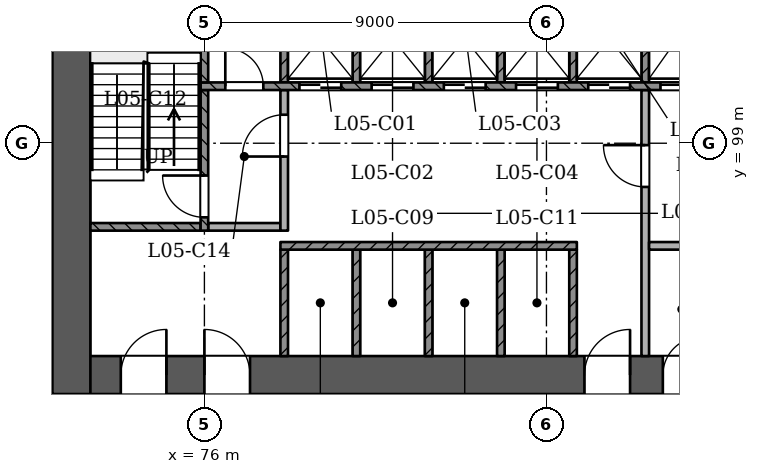
"""IFC4 building model, lengths in metres.
Left out: names, types, materials, properties, quantities, classifications, styles, units other than length and angle.
Written with IfcOpenShell. Run it as: python <this file> out.ifc"""

import sys

from ifc_helpers import new_model, si_unit, direction, frame, frame_2d, origin, place, context, subcontext, project, spatial, rectangle, extrude, element, fill, save


model = new_model("IFC4")
c1 = context("Model", 3, precision=1e-05, world=origin(), true_north=direction((0.0, 1.0)))
c2 = subcontext(c1, "Body", "Model", "MODEL_VIEW")
j1 = project(units=[si_unit("LENGTHUNIT", "METRE"), si_unit("PLANEANGLEUNIT", "RADIAN")], contexts=[c1])
p1 = place(None, origin())
s1 = spatial("IfcSite", under=j1, at=p1, CompositionType="ELEMENT")
p2 = place(p1, origin())
s2 = spatial("IfcBuilding", under=s1, at=p2, CompositionType="ELEMENT")
p3 = place(p2, frame((0.0, 0.0, 27.0)))
s3 = spatial("IfcBuildingStorey", under=s2, at=p3, CompositionType="ELEMENT", Elevation=27.0)
p4 = place(p3, frame((72.5, 92.9, 0.0), z_axis=(0.0, 0.0, 1.0), x_axis=(1.0, 0.0, 0.0)))
e1 = element("IfcWall", 1, at=p4, inside=s3, PredefinedType="SHEAR", context=c2, shape_type="SweptSolid", body=[
    extrude(rectangle(XDim=25.5, YDim=1.0, at=frame_2d((12.75, 0.0))), origin(), (0.0, 0.0, 1.0), 3.6),
])
p5 = place(p4, frame((1.3, 0.0, 0.0)))
e2 = element("IfcOpeningElement", 2, at=p5, cuts=e1, PredefinedType="OPENING", context=c2, shape_type="SweptSolid", body=[
    extrude(rectangle(XDim=1.2, YDim=2.1, at=frame_2d((0.6, 1.05))), frame((0.0, 0.51, 0.0), z_axis=(0.0, -1.0, 0.0), x_axis=(1.0, 0.0, 0.0)), (0.0, 0.0, 1.0), 1.021),
])
p6 = place(p4, frame((3.5, 0.0, 0.0)))
e3 = element("IfcOpeningElement", 3, at=p6, cuts=e1, PredefinedType="OPENING", context=c2, shape_type="SweptSolid", body=[
    extrude(rectangle(XDim=1.2, YDim=2.1, at=frame_2d((0.6, 1.05))), frame((0.0, 0.51, 0.0), z_axis=(0.0, -1.0, 0.0), x_axis=(1.0, 0.0, 0.0)), (0.0, 0.0, 1.0), 1.021),
])
p7 = place(p4, frame((13.5, 0.0, 0.0)))
e4 = element("IfcOpeningElement", 4, at=p7, cuts=e1, PredefinedType="OPENING", context=c2, shape_type="SweptSolid", body=[
    extrude(rectangle(XDim=1.2, YDim=2.1, at=frame_2d((0.6, 1.05))), frame((0.0, 0.51, 0.0), z_axis=(0.0, -1.0, 0.0), x_axis=(1.0, 0.0, 0.0)), (0.0, 0.0, 1.0), 1.021),
])
p8 = place(p4, frame((15.562, 0.0, 0.0)))
e5 = element("IfcOpeningElement", 5, at=p8, cuts=e1, PredefinedType="OPENING", context=c2, shape_type="SweptSolid", body=[
    extrude(rectangle(XDim=1.0, YDim=2.1, at=frame_2d((0.5, 1.05))), frame((0.0, 0.51, 0.0), z_axis=(0.0, -1.0, 0.0), x_axis=(1.0, 0.0, 0.0)), (0.0, 0.0, 1.0), 1.021),
])
p9 = place(p4, frame((17.8, 0.0, 0.0)))
e6 = element("IfcOpeningElement", 6, at=p9, cuts=e1, PredefinedType="OPENING", context=c2, shape_type="SweptSolid", body=[
    extrude(rectangle(XDim=1.0, YDim=2.1, at=frame_2d((0.5, 1.05))), frame((0.0, 0.51, 0.0), z_axis=(0.0, -1.0, 0.0), x_axis=(1.0, 0.0, 0.0)), (0.0, 0.0, 1.0), 1.021),
])
p10 = place(p4, frame((20.35, 0.0, 0.0)))
e7 = element("IfcOpeningElement", 7, at=p10, cuts=e1, PredefinedType="OPENING", context=c2, shape_type="SweptSolid", body=[
    extrude(rectangle(XDim=1.0, YDim=2.1, at=frame_2d((0.5, 1.05))), frame((0.0, 0.51, 0.0), z_axis=(0.0, -1.0, 0.0), x_axis=(1.0, 0.0, 0.0)), (0.0, 0.0, 1.0), 1.021),
])
p11 = place(p4, frame((22.837, 0.0, 0.0)))
e8 = element("IfcOpeningElement", 8, at=p11, cuts=e1, PredefinedType="OPENING", context=c2, shape_type="SweptSolid", body=[
    extrude(rectangle(XDim=1.0, YDim=2.1, at=frame_2d((0.5, 1.05))), frame((0.0, 0.51, 0.0), z_axis=(0.0, -1.0, 0.0), x_axis=(1.0, 0.0, 0.0)), (0.0, 0.0, 1.0), 1.021),
])
p12 = place(p3, frame((72.5, 103.9, 0.0), z_axis=(0.0, 0.0, 1.0), x_axis=(0.0, -1.0, 0.0)))
e9 = element("IfcWall", 9, at=p12, inside=s3, PredefinedType="SHEAR", context=c2, shape_type="SweptSolid", body=[
    extrude(rectangle(XDim=11.5, YDim=1.0, at=frame_2d((5.75, 0.0))), origin(), (0.0, 0.0, 1.0), 3.6),
])
p13 = place(p3, frame((61.193, 96.236, 0.0), z_axis=(0.0, 0.0, 1.0), x_axis=(0.49999953585, -0.866025671762, 0.0)))
e10 = element("IfcWall", 10, at=p13, inside=s3, PredefinedType="PARTITIONING", context=c2, shape_type="SweptSolid", body=[
    extrude(rectangle(XDim=45.0, YDim=0.15, at=frame_2d((22.5, 0.0))), origin(), (0.0, 0.0, 1.0), 2.7),
])
p14 = place(p13, frame((1.75, 0.0, 0.0)))
e11 = element("IfcOpeningElement", 11, at=p14, cuts=e10, PredefinedType="OPENING", context=c2, shape_type="SweptSolid", body=[
    extrude(rectangle(XDim=1.0, YDim=2.1, at=frame_2d((0.5, 1.05))), frame((0.0, 0.085, 0.0), z_axis=(0.0, -1.0, 0.0), x_axis=(1.0, 0.0, 0.0)), (0.0, 0.0, 1.0), 0.171),
])
p15 = place(p13, frame((7.3, 0.0, 0.0)))
e12 = element("IfcOpeningElement", 12, at=p15, cuts=e10, PredefinedType="OPENING", context=c2, shape_type="SweptSolid", body=[
    extrude(rectangle(XDim=1.2, YDim=2.1, at=frame_2d((0.6, 1.05))), frame((0.0, 0.085, 0.0), z_axis=(0.0, -1.0, 0.0), x_axis=(1.0, 0.0, 0.0)), (0.0, 0.0, 1.0), 0.171),
])
p16 = place(p13, frame((14.071, 0.0, 0.0)))
e13 = element("IfcOpeningElement", 13, at=p16, cuts=e10, PredefinedType="OPENING", context=c2, shape_type="SweptSolid", body=[
    extrude(rectangle(XDim=1.1, YDim=2.1, at=frame_2d((0.55, 1.05))), frame((0.0, 0.085, 0.0), z_axis=(0.0, -1.0, 0.0), x_axis=(1.0, 0.0, 0.0)), (0.0, 0.0, 1.0), 0.171),
])
p17 = place(p13, frame((20.78, 0.0, 0.0)))
e14 = element("IfcOpeningElement", 14, at=p17, cuts=e10, PredefinedType="OPENING", context=c2, shape_type="SweptSolid", body=[
    extrude(rectangle(XDim=1.0, YDim=2.1, at=frame_2d((0.5, 1.05))), frame((0.0, 0.085, 0.0), z_axis=(0.0, -1.0, 0.0), x_axis=(1.0, 0.0, 0.0)), (0.0, 0.0, 1.0), 0.171),
])
p18 = place(p13, frame((23.105, 0.0, 0.0)))
e15 = element("IfcOpeningElement", 15, at=p18, cuts=e10, PredefinedType="OPENING", context=c2, shape_type="SweptSolid", body=[
    extrude(rectangle(XDim=1.0, YDim=2.1, at=frame_2d((0.5, 1.05))), frame((0.0, 0.085, 0.0), z_axis=(0.0, -1.0, 0.0), x_axis=(1.0, 0.0, 0.0)), (0.0, 0.0, 1.0), 0.171),
])
p19 = place(p13, frame((28.75, 0.0, 0.0)))
e16 = element("IfcOpeningElement", 16, at=p19, cuts=e10, PredefinedType="OPENING", context=c2, shape_type="SweptSolid", body=[
    extrude(rectangle(XDim=1.0, YDim=2.1, at=frame_2d((0.5, 1.05))), frame((0.0, 0.085, 0.0), z_axis=(0.0, -1.0, 0.0), x_axis=(1.0, 0.0, 0.0)), (0.0, 0.0, 1.0), 0.171),
])
p20 = place(p13, frame((34.3, 0.0, 0.0)))
e17 = element("IfcOpeningElement", 17, at=p20, cuts=e10, PredefinedType="OPENING", context=c2, shape_type="SweptSolid", body=[
    extrude(rectangle(XDim=1.2, YDim=2.1, at=frame_2d((0.6, 1.05))), frame((0.0, 0.085, 0.0), z_axis=(0.0, -1.0, 0.0), x_axis=(1.0, 0.0, 0.0)), (0.0, 0.0, 1.0), 0.171),
])
p21 = place(p13, frame((43.28, 0.0, 0.0)))
e18 = element("IfcOpeningElement", 18, at=p21, cuts=e10, PredefinedType="OPENING", context=c2, shape_type="SweptSolid", body=[
    extrude(rectangle(XDim=1.0, YDim=2.1, at=frame_2d((0.5, 1.05))), frame((0.0, 0.085, 0.0), z_axis=(0.0, -1.0, 0.0), x_axis=(1.0, 0.0, 0.0)), (0.0, 0.0, 1.0), 0.171),
])
for number, where, z_axis, x_axis in (
    (19, (78.1, 93.4, 0.0), (0.0, 0.0, 1.0), (0.0, 1.0, 0.0)),
    (20, (80.0, 93.4, 0.0), (0.0, 0.0, 1.0), (0.0, 1.0, 0.0)),
    (21, (81.9, 93.4, 0.0), (0.0, 0.0, 1.0), (0.0, 1.0, 0.0)),
    (22, (83.8, 93.4, 0.0), (0.0, 0.0, 1.0), (0.0, 1.0, 0.0)),
    (23, (85.7, 93.4, 0.0), (0.0, 0.0, 1.0), (0.0, 1.0, 0.0)),
):
    element("IfcWall", number, at=place(p3, frame(where, z_axis=z_axis, x_axis=x_axis)), inside=s3, PredefinedType="SOLIDWALL", context=c2, shape_type="SweptSolid", body=[
        extrude(rectangle(XDim=2.8, YDim=0.2, at=frame_2d((1.4, 0.0))), origin(), (0.0, 0.0, 1.0), 3.1),
    ])
p22 = place(p3, frame((87.6, 93.4, 0.0), z_axis=(0.0, 0.0, 1.0), x_axis=(0.0, 1.0, 0.0)))
e24 = element("IfcWall", 24, at=p22, inside=s3, PredefinedType="PARTITIONING", context=c2, shape_type="SweptSolid", body=[
    extrude(rectangle(XDim=7.0, YDim=0.2, at=frame_2d((3.5, 0.0))), origin(), (0.0, 0.0, 1.0), 3.1),
])
p23 = place(p22, frame((4.45, 0.0, 0.0)))
e25 = element("IfcOpeningElement", 25, at=p23, cuts=e24, PredefinedType="OPENING", context=c2, shape_type="SweptSolid", body=[
    extrude(rectangle(XDim=1.1, YDim=2.1, at=frame_2d((0.55, 1.05))), frame((0.0, 0.11, 0.0), z_axis=(0.0, -1.0, 0.0), x_axis=(1.0, 0.0, 0.0)), (0.0, 0.0, 1.0), 0.221),
])
p24 = place(p3, frame((78.0, 96.3, 0.0), z_axis=(0.0, 0.0, 1.0), x_axis=(1.0, 0.0, 0.0)))
e26 = element("IfcWall", 26, at=p24, inside=s3, PredefinedType="SOLIDWALL", context=c2, shape_type="SweptSolid", body=[
    extrude(rectangle(XDim=7.8, YDim=0.2, at=frame_2d((3.9, 0.0))), origin(), (0.0, 0.0, 1.0), 3.1),
])
p25 = place(p3, frame((87.7, 96.3, 0.0), z_axis=(0.0, 0.0, 1.0), x_axis=(1.0, 0.0, 0.0)))
e27 = element("IfcWall", 27, at=p25, inside=s3, PredefinedType="PARTITIONING", context=c2, shape_type="SweptSolid", body=[
    extrude(rectangle(XDim=3.6, YDim=0.2, at=frame_2d((1.8, 0.0))), origin(), (0.0, 0.0, 1.0), 3.1),
])
p26 = place(p3, frame((73.0, 96.8, 0.0), z_axis=(0.0, 0.0, 1.0), x_axis=(1.0, 0.0, 0.0)))
e28 = element("IfcWall", 28, at=p26, inside=s3, PredefinedType="SOLIDWALL", context=c2, shape_type="SweptSolid", body=[
    extrude(rectangle(XDim=2.9, YDim=0.2, at=frame_2d((1.45, 0.0))), origin(), (0.0, 0.0, 1.0), 3.1),
])
p27 = place(p3, frame((76.0, 96.7, 0.0), z_axis=(0.0, 0.0, 1.0), x_axis=(0.0, 1.0, 0.0)))
e29 = element("IfcWall", 29, at=p27, inside=s3, PredefinedType="SOLIDWALL", context=c2, shape_type="SweptSolid", body=[
    extrude(rectangle(XDim=3.7, YDim=0.2, at=frame_2d((1.85, 0.0))), origin(), (0.0, 0.0, 1.0), 3.1),
])
p28 = place(p27, frame((0.35, 0.0, 0.0)))
e30 = element("IfcOpeningElement", 30, at=p28, cuts=e29, PredefinedType="OPENING", context=c2, shape_type="SweptSolid", body=[
    extrude(rectangle(XDim=1.1, YDim=2.1, at=frame_2d((0.55, 1.05))), frame((0.0, 0.11, 0.0), z_axis=(0.0, -1.0, 0.0), x_axis=(1.0, 0.0, 0.0)), (0.0, 0.0, 1.0), 0.221),
])
p29 = place(p3, frame((76.1, 96.8, 0.0), z_axis=(0.0, 0.0, 1.0), x_axis=(1.0, 0.0, 0.0)))
e31 = element("IfcWall", 31, at=p29, inside=s3, PredefinedType="PARTITIONING", context=c2, shape_type="SweptSolid", body=[
    extrude(rectangle(XDim=1.9, YDim=0.2, at=frame_2d((0.95, 0.0))), origin(), (0.0, 0.0, 1.0), 3.1),
])
p30 = place(p3, frame((78.1, 96.7, 0.0), z_axis=(0.0, 0.0, 1.0), x_axis=(0.0, 1.0, 0.0)))
e32 = element("IfcWall", 32, at=p30, inside=s3, PredefinedType="PARTITIONING", context=c2, shape_type="SweptSolid", body=[
    extrude(rectangle(XDim=3.7, YDim=0.2, at=frame_2d((1.85, 0.0))), origin(), (0.0, 0.0, 1.0), 3.1),
])
p31 = place(p30, frame((1.95, 0.0, 0.0)))
e33 = element("IfcOpeningElement", 33, at=p31, cuts=e32, PredefinedType="OPENING", context=c2, shape_type="SweptSolid", body=[
    extrude(rectangle(XDim=1.1, YDim=2.1, at=frame_2d((0.55, 1.05))), frame((0.0, 0.11, 0.0), z_axis=(0.0, -1.0, 0.0), x_axis=(1.0, 0.0, 0.0)), (0.0, 0.0, 1.0), 0.221),
])
p32 = place(p3, frame((75.9, 100.5, 0.0), z_axis=(0.0, 0.0, 1.0), x_axis=(1.0, 0.0, 0.0)))
e34 = element("IfcWall", 34, at=p32, inside=s3, PredefinedType="SOLIDWALL", context=c2, shape_type="SweptSolid", body=[
    extrude(rectangle(XDim=18.2, YDim=0.2, at=frame_2d((9.1, 0.0))), origin(), (0.0, 0.0, 1.0), 3.1),
])
p33 = place(p32, frame((2.6, 0.0, 0.0)))
e35 = element("IfcOpeningElement", 35, at=p33, cuts=e34, PredefinedType="OPENING", context=c2, shape_type="SweptSolid", body=[
    extrude(rectangle(XDim=1.1, YDim=2.1, at=frame_2d((0.55, 1.05))), frame((0.0, 0.11, 0.0), z_axis=(0.0, -1.0, 0.0), x_axis=(1.0, 0.0, 0.0)), (0.0, 0.0, 1.0), 0.221),
])
p34 = place(p32, frame((4.5, 0.0, 0.0)))
e36 = element("IfcOpeningElement", 36, at=p34, cuts=e34, PredefinedType="OPENING", context=c2, shape_type="SweptSolid", body=[
    extrude(rectangle(XDim=1.1, YDim=2.1, at=frame_2d((0.55, 1.05))), frame((0.0, 0.11, 0.0), z_axis=(0.0, -1.0, 0.0), x_axis=(1.0, 0.0, 0.0)), (0.0, 0.0, 1.0), 0.221),
])
p35 = place(p32, frame((6.4, 0.0, 0.0)))
e37 = element("IfcOpeningElement", 37, at=p35, cuts=e34, PredefinedType="OPENING", context=c2, shape_type="SweptSolid", body=[
    extrude(rectangle(XDim=1.1, YDim=2.1, at=frame_2d((0.55, 1.05))), frame((0.0, 0.11, 0.0), z_axis=(0.0, -1.0, 0.0), x_axis=(1.0, 0.0, 0.0)), (0.0, 0.0, 1.0), 0.221),
])
p36 = place(p32, frame((8.3, 0.0, 0.0)))
e38 = element("IfcOpeningElement", 38, at=p36, cuts=e34, PredefinedType="OPENING", context=c2, shape_type="SweptSolid", body=[
    extrude(rectangle(XDim=1.1, YDim=2.1, at=frame_2d((0.55, 1.05))), frame((0.0, 0.11, 0.0), z_axis=(0.0, -1.0, 0.0), x_axis=(1.0, 0.0, 0.0)), (0.0, 0.0, 1.0), 0.221),
])
p37 = place(p32, frame((10.2, 0.0, 0.0)))
e39 = element("IfcOpeningElement", 39, at=p37, cuts=e34, PredefinedType="OPENING", context=c2, shape_type="SweptSolid", body=[
    extrude(rectangle(XDim=1.1, YDim=2.1, at=frame_2d((0.55, 1.05))), frame((0.0, 0.11, 0.0), z_axis=(0.0, -1.0, 0.0), x_axis=(1.0, 0.0, 0.0)), (0.0, 0.0, 1.0), 0.221),
])
p38 = place(p32, frame((12.1, 0.0, 0.0)))
e40 = element("IfcOpeningElement", 40, at=p38, cuts=e34, PredefinedType="OPENING", context=c2, shape_type="SweptSolid", body=[
    extrude(rectangle(XDim=1.1, YDim=2.1, at=frame_2d((0.55, 1.05))), frame((0.0, 0.11, 0.0), z_axis=(0.0, -1.0, 0.0), x_axis=(1.0, 0.0, 0.0)), (0.0, 0.0, 1.0), 0.221),
])
p39 = place(p32, frame((14.0, 0.0, 0.0)))
e41 = element("IfcOpeningElement", 41, at=p39, cuts=e34, PredefinedType="OPENING", context=c2, shape_type="SweptSolid", body=[
    extrude(rectangle(XDim=1.1, YDim=2.1, at=frame_2d((0.55, 1.05))), frame((0.0, 0.11, 0.0), z_axis=(0.0, -1.0, 0.0), x_axis=(1.0, 0.0, 0.0)), (0.0, 0.0, 1.0), 0.221),
])
p40 = place(p32, frame((0.65, 0.0, 0.0)))
e42 = element("IfcOpeningElement", 42, at=p40, cuts=e34, PredefinedType="OPENING", context=c2, shape_type="SweptSolid", body=[
    extrude(rectangle(XDim=1.0, YDim=2.1, at=frame_2d((0.5, 1.05))), frame((0.0, 0.11, 0.0), z_axis=(0.0, -1.0, 0.0), x_axis=(1.0, 0.0, 0.0)), (0.0, 0.0, 1.0), 0.221),
])
p41 = place(p32, frame((16.3, 0.0, 0.0)))
e43 = element("IfcOpeningElement", 43, at=p41, cuts=e34, PredefinedType="OPENING", context=c2, shape_type="SweptSolid", body=[
    extrude(rectangle(XDim=1.0, YDim=2.1, at=frame_2d((0.5, 1.05))), frame((0.0, 0.11, 0.0), z_axis=(0.0, -1.0, 0.0), x_axis=(1.0, 0.0, 0.0)), (0.0, 0.0, 1.0), 0.221),
])
for number, where, z_axis, x_axis in (
    (44, (76.0, 100.6, 0.0), (0.0, 0.0, 1.0), (0.0, 1.0, 0.0)),
    (45, (78.1, 100.6, 0.0), (0.0, 0.0, 1.0), (0.0, 1.0, 0.0)),
    (46, (80.0, 100.6, 0.0), (0.0, 0.0, 1.0), (0.0, 1.0, 0.0)),
    (47, (81.9, 100.6, 0.0), (0.0, 0.0, 1.0), (0.0, 1.0, 0.0)),
    (48, (83.8, 100.6, 0.0), (0.0, 0.0, 1.0), (0.0, 1.0, 0.0)),
    (49, (85.7, 100.6, 0.0), (0.0, 0.0, 1.0), (0.0, 1.0, 0.0)),
    (50, (87.6, 100.6, 0.0), (0.0, 0.0, 1.0), (0.0, 1.0, 0.0)),
):
    element("IfcWall", number, at=place(p3, frame(where, z_axis=z_axis, x_axis=x_axis)), inside=s3, PredefinedType="SOLIDWALL", context=c2, shape_type="SweptSolid", body=[
        extrude(rectangle(XDim=2.8, YDim=0.2, at=frame_2d((1.4, 0.0))), origin(), (0.0, 0.0, 1.0), 3.1),
    ])
p42 = place(p33, origin())
e51 = element("IfcDoor", 51, at=p42, inside=s3, OperationType="SLIDING_TO_RIGHT", PredefinedType="NOTDEFINED", context=c2, shape_type="SweptSolid", body=[
    extrude(rectangle(XDim=1.1, YDim=2.1, at=frame_2d((0.55, 1.05))), frame((0.0, 0.025, 0.0), z_axis=(0.0, -1.0, 0.0), x_axis=(1.0, 0.0, 0.0)), (0.0, 0.0, 1.0), 0.05),
])
fill(e35, e51)
p43 = place(p34, origin())
e52 = element("IfcDoor", 52, at=p43, inside=s3, OperationType="SLIDING_TO_LEFT", PredefinedType="NOTDEFINED", context=c2, shape_type="SweptSolid", body=[
    extrude(rectangle(XDim=1.1, YDim=2.1, at=frame_2d((0.55, 1.05))), frame((0.0, 0.025, 0.0), z_axis=(0.0, -1.0, 0.0), x_axis=(1.0, 0.0, 0.0)), (0.0, 0.0, 1.0), 0.05),
])
fill(e36, e52)
p44 = place(p35, origin())
e53 = element("IfcDoor", 53, at=p44, inside=s3, OperationType="SLIDING_TO_RIGHT", PredefinedType="NOTDEFINED", context=c2, shape_type="SweptSolid", body=[
    extrude(rectangle(XDim=1.1, YDim=2.1, at=frame_2d((0.55, 1.05))), frame((0.0, 0.025, 0.0), z_axis=(0.0, -1.0, 0.0), x_axis=(1.0, 0.0, 0.0)), (0.0, 0.0, 1.0), 0.05),
])
fill(e37, e53)
p45 = place(p36, origin())
e54 = element("IfcDoor", 54, at=p45, inside=s3, OperationType="SLIDING_TO_LEFT", PredefinedType="NOTDEFINED", context=c2, shape_type="SweptSolid", body=[
    extrude(rectangle(XDim=1.1, YDim=2.1, at=frame_2d((0.55, 1.05))), frame((0.0, 0.025, 0.0), z_axis=(0.0, -1.0, 0.0), x_axis=(1.0, 0.0, 0.0)), (0.0, 0.0, 1.0), 0.05),
])
fill(e38, e54)
p46 = place(p37, origin())
e55 = element("IfcDoor", 55, at=p46, inside=s3, OperationType="SLIDING_TO_RIGHT", PredefinedType="NOTDEFINED", context=c2, shape_type="SweptSolid", body=[
    extrude(rectangle(XDim=1.1, YDim=2.1, at=frame_2d((0.55, 1.05))), frame((0.0, 0.025, 0.0), z_axis=(0.0, -1.0, 0.0), x_axis=(1.0, 0.0, 0.0)), (0.0, 0.0, 1.0), 0.05),
])
fill(e39, e55)
p47 = place(p38, origin())
e56 = element("IfcDoor", 56, at=p47, inside=s3, OperationType="SLIDING_TO_RIGHT", PredefinedType="NOTDEFINED", context=c2, shape_type="SweptSolid", body=[
    extrude(rectangle(XDim=1.1, YDim=2.1, at=frame_2d((0.55, 1.05))), frame((0.0, 0.025, 0.0), z_axis=(0.0, -1.0, 0.0), x_axis=(1.0, 0.0, 0.0)), (0.0, 0.0, 1.0), 0.05),
])
fill(e40, e56)
p48 = place(p28, origin())
e57 = element("IfcDoor", 57, at=p48, inside=s3, OperationType="SINGLE_SWING_RIGHT", PredefinedType="NOTDEFINED", context=c2, shape_type="SweptSolid", body=[
    extrude(rectangle(XDim=1.1, YDim=2.1, at=frame_2d((0.55, 1.05))), frame((0.0, 0.025, 0.0), z_axis=(0.0, -1.0, 0.0), x_axis=(1.0, 0.0, 0.0)), (0.0, 0.0, 1.0), 0.05),
])
fill(e30, e57)
p49 = place(p31, origin())
e58 = element("IfcDoor", 58, at=p49, inside=s3, OperationType="SINGLE_SWING_LEFT", PredefinedType="NOTDEFINED", context=c2, shape_type="SweptSolid", body=[
    extrude(rectangle(XDim=1.1, YDim=2.1, at=frame_2d((0.55, 1.05))), frame((0.0, 0.025, 0.0), z_axis=(0.0, -1.0, 0.0), x_axis=(1.0, 0.0, 0.0)), (0.0, 0.0, 1.0), 0.05),
])
fill(e33, e58)
p50 = place(p23, origin())
e59 = element("IfcDoor", 59, at=p50, inside=s3, OperationType="SINGLE_SWING_RIGHT", PredefinedType="NOTDEFINED", context=c2, shape_type="SweptSolid", body=[
    extrude(rectangle(XDim=1.1, YDim=2.1, at=frame_2d((0.55, 1.05))), frame((0.0, 0.025, 0.0), z_axis=(0.0, -1.0, 0.0), x_axis=(1.0, 0.0, 0.0)), (0.0, 0.0, 1.0), 0.05),
])
fill(e25, e59)
p51 = place(p5, origin())
e60 = element("IfcDoor", 60, at=p51, inside=s3, OperationType="SINGLE_SWING_RIGHT", PredefinedType="NOTDEFINED", context=c2, shape_type="SweptSolid", body=[
    extrude(rectangle(XDim=1.2, YDim=2.1, at=frame_2d((0.6, 1.05))), frame((0.0, 0.025, 0.0), z_axis=(0.0, -1.0, 0.0), x_axis=(1.0, 0.0, 0.0)), (0.0, 0.0, 1.0), 0.05),
])
fill(e2, e60)
p52 = place(p6, origin())
e61 = element("IfcDoor", 61, at=p52, inside=s3, OperationType="SINGLE_SWING_LEFT", PredefinedType="NOTDEFINED", context=c2, shape_type="SweptSolid", body=[
    extrude(rectangle(XDim=1.2, YDim=2.1, at=frame_2d((0.6, 1.05))), frame((0.0, 0.025, 0.0), z_axis=(0.0, -1.0, 0.0), x_axis=(1.0, 0.0, 0.0)), (0.0, 0.0, 1.0), 0.05),
])
fill(e3, e61)
p53 = place(p7, origin())
e62 = element("IfcDoor", 62, at=p53, inside=s3, OperationType="SINGLE_SWING_RIGHT", PredefinedType="NOTDEFINED", context=c2, shape_type="SweptSolid", body=[
    extrude(rectangle(XDim=1.2, YDim=2.1, at=frame_2d((0.6, 1.05))), frame((0.0, 0.025, 0.0), z_axis=(0.0, -1.0, 0.0), x_axis=(1.0, 0.0, 0.0)), (0.0, 0.0, 1.0), 0.05),
])
fill(e4, e62)
p54 = place(p40, origin())
e63 = element("IfcDoor", 63, at=p54, inside=s3, OperationType="SINGLE_SWING_LEFT", PredefinedType="NOTDEFINED", context=c2, shape_type="SweptSolid", body=[
    extrude(rectangle(XDim=1.0, YDim=2.1, at=frame_2d((0.5, 1.05))), frame((0.0, 0.025, 0.0), z_axis=(0.0, -1.0, 0.0), x_axis=(1.0, 0.0, 0.0)), (0.0, 0.0, 1.0), 0.05),
])
fill(e42, e63)
p55 = place(p8, origin())
e64 = element("IfcDoor", 64, at=p55, inside=s3, OperationType="SINGLE_SWING_RIGHT", PredefinedType="NOTDEFINED", context=c2, shape_type="SweptSolid", body=[
    extrude(rectangle(XDim=1.0, YDim=2.1, at=frame_2d((0.5, 1.05))), frame((0.0, 0.025, 0.0), z_axis=(0.0, -1.0, 0.0), x_axis=(1.0, 0.0, 0.0)), (0.0, 0.0, 1.0), 0.05),
])
fill(e5, e64)
save(model, sys.argv[1])
